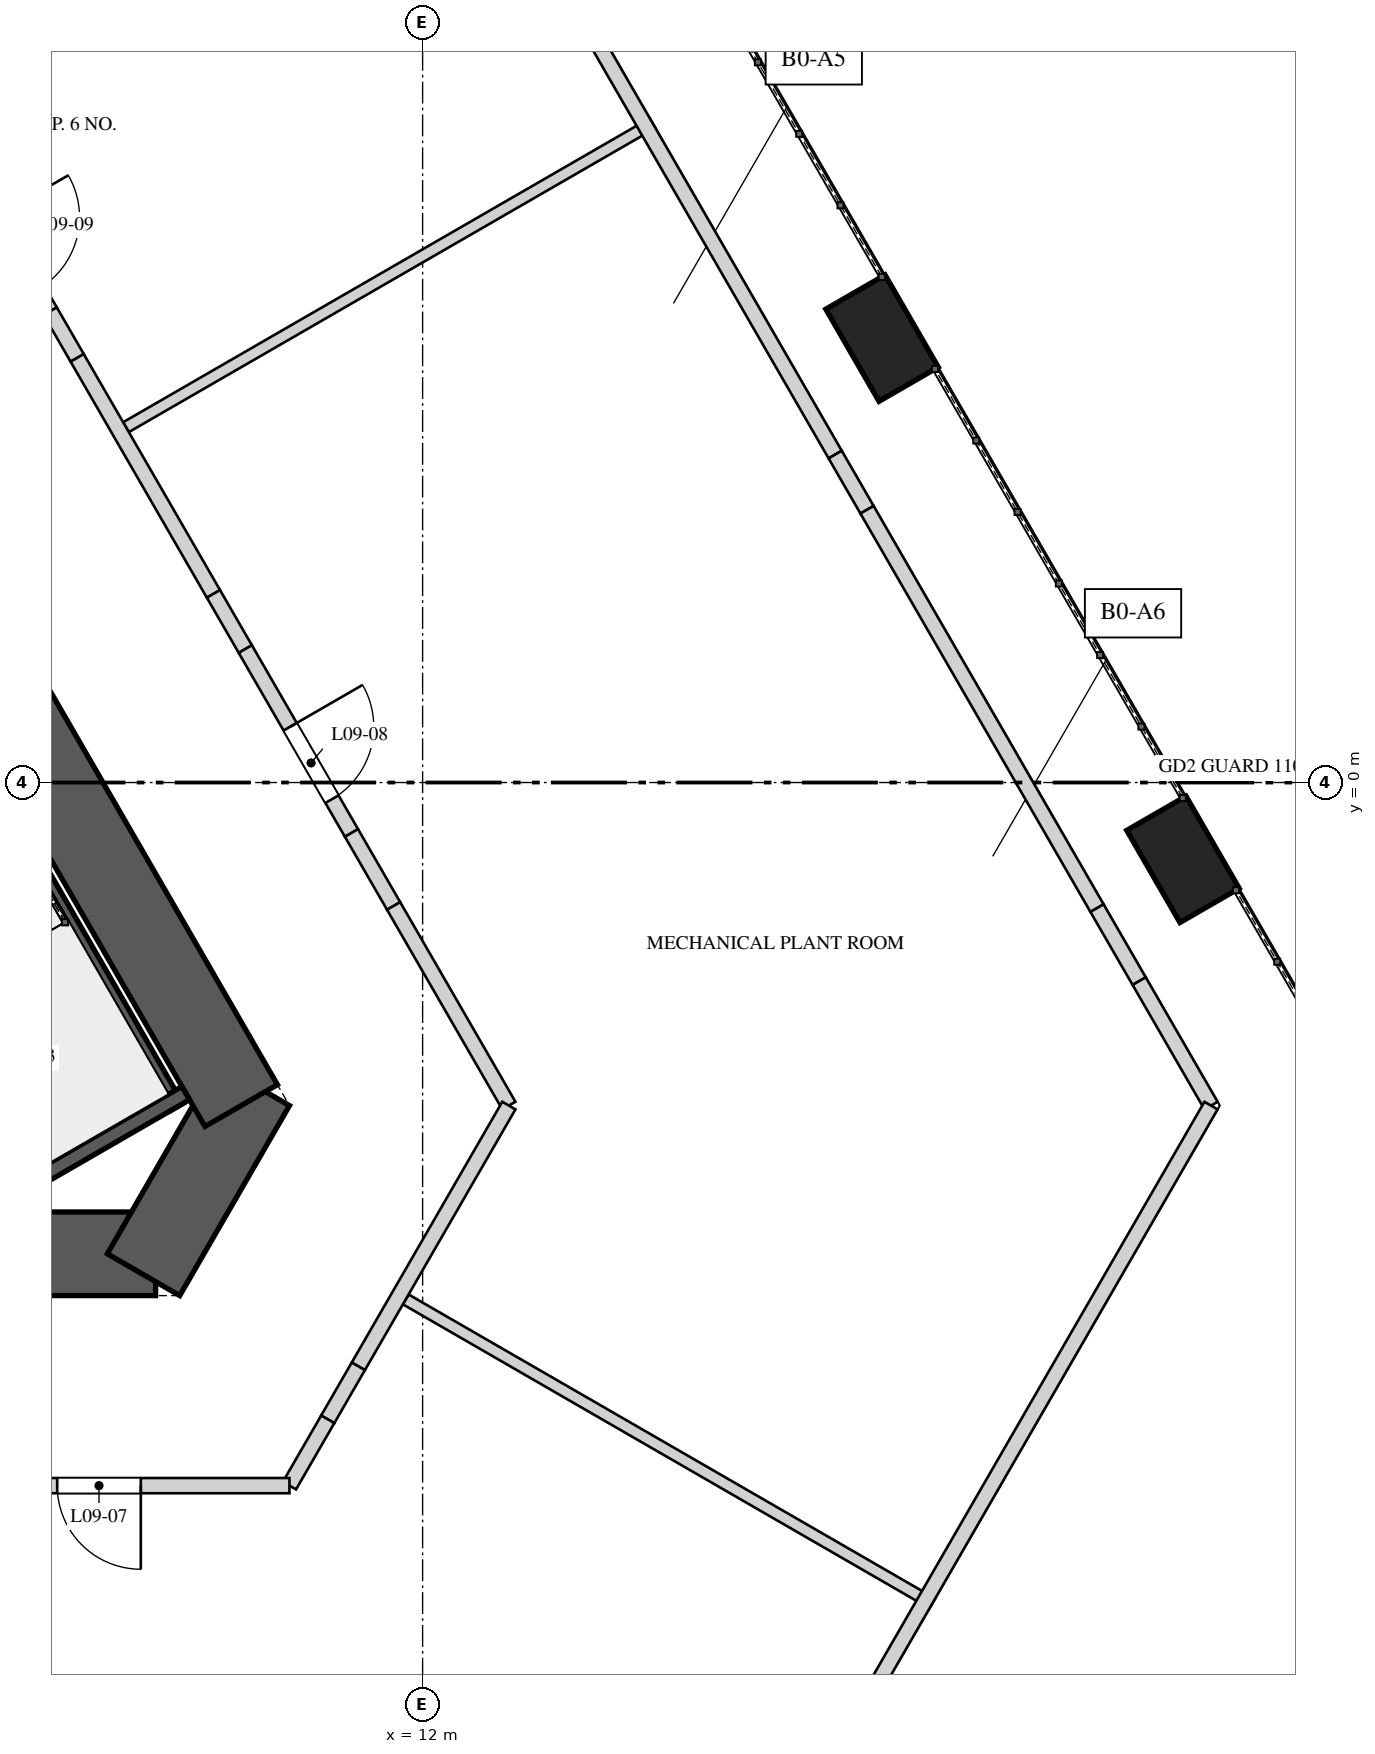
"""IFC4 building model, lengths in metres.
Left out: names, types, materials, properties, quantities, classifications, styles, units other than length and angle.
Written with IfcOpenShell. Run it as: python <this file> out.ifc"""

import sys

from ifc_helpers import new_model, si_unit, direction, frame, frame_2d, origin, origin_2d, place, context, subcontext, project, spatial, rectangle, extrude, element, fill, save


model = new_model("IFC4")
c1 = context("Model", 3, precision=1e-05, world=origin(), true_north=direction((0.0, 1.0)))
c2 = subcontext(c1, "Body", "Model", "MODEL_VIEW")
j1 = project(units=[si_unit("LENGTHUNIT", "METRE"), si_unit("PLANEANGLEUNIT", "RADIAN")], contexts=[c1])
p1 = place(None, origin())
s1 = spatial("IfcSite", under=j1, at=p1, CompositionType="ELEMENT")
p2 = place(p1, origin())
s2 = spatial("IfcBuilding", under=s1, at=p2, CompositionType="ELEMENT")
p3 = place(p2, frame((0.0, 0.0, 46.0)))
s3 = spatial("IfcBuildingStorey", under=s2, at=p3, CompositionType="ELEMENT", Elevation=46.0)
p4 = place(p3, frame((-8.487, -6.2, 0.0), z_axis=(0.0, 0.0, 1.0), x_axis=(1.0, 0.0, 0.0)))
e1 = element("IfcWall", 1, at=p4, inside=s3, PredefinedType="SHEAR", context=c2, shape_type="SweptSolid", body=[
    extrude(rectangle(XDim=16.974, YDim=1.1, at=frame_2d((8.487, 0.0))), origin(), (0.0, 0.0, 1.0), 5.2),
])
p5 = place(p4, frame((6.692, 0.0, 0.0)))
e2 = element("IfcOpeningElement", 2, at=p5, cuts=e1, PredefinedType="OPENING", context=c2, shape_type="SweptSolid", body=[
    extrude(rectangle(XDim=1.0, YDim=2.4, at=frame_2d((0.5, 1.2))), frame((0.0, 0.56, 0.0), z_axis=(0.0, -1.0, 0.0), x_axis=(1.0, 0.0, 0.0)), (0.0, 0.0, 1.0), 1.12),
])
p6 = place(p4, frame((14.397, 0.0, 0.0)))
e3 = element("IfcOpeningElement", 3, at=p6, cuts=e1, PredefinedType="OPENING", context=c2, shape_type="SweptSolid", body=[
    extrude(rectangle(XDim=0.8, YDim=2.1, at=frame_2d((0.4, 1.05))), frame((0.0, 0.56, 0.0), z_axis=(0.0, -1.0, 0.0), x_axis=(1.0, 0.0, 0.0)), (0.0, 0.0, 1.0), 1.12),
])
p7 = place(p3, frame((8.328, -6.475, 0.0), z_axis=(0.0, 0.0, 1.0), x_axis=(0.499995765644, 0.866027848477, 0.0)))
e4 = element("IfcWall", 4, at=p7, inside=s3, PredefinedType="SHEAR", context=c2, shape_type="SweptSolid", body=[
    extrude(rectangle(XDim=2.887, YDim=1.1, at=frame_2d((1.443, 0.0))), origin(), (0.0, 0.0, 1.0), 5.2),
])
p8 = place(p3, frame((9.613, -4.25, 0.0), z_axis=(0.0, 0.0, 1.0), x_axis=(-0.500001757713, 0.866024388966, 0.0)))
e5 = element("IfcWall", 5, at=p8, inside=s3, PredefinedType="SHEAR", context=c2, shape_type="SweptSolid", body=[
    extrude(rectangle(XDim=16.974, YDim=1.1, at=frame_2d((8.487, 0.0))), origin(), (0.0, 0.0, 1.0), 5.2),
])
p9 = place(p8, frame((6.762, 0.0, 0.0)))
e6 = element("IfcOpeningElement", 6, at=p9, cuts=e5, PredefinedType="OPENING", context=c2, shape_type="SweptSolid", body=[
    extrude(rectangle(XDim=1.0, YDim=2.4, at=frame_2d((0.5, 1.2))), frame((0.0, 0.56, 0.0), z_axis=(0.0, -1.0, 0.0), x_axis=(1.0, 0.0, 0.0)), (0.0, 0.0, 1.0), 1.12),
])
p10 = place(p8, frame((13.889, 0.0, 0.0)))
e7 = element("IfcOpeningElement", 7, at=p10, cuts=e5, PredefinedType="OPENING", context=c2, shape_type="SweptSolid", body=[
    extrude(rectangle(XDim=0.8, YDim=2.1, at=frame_2d((0.4, 1.05))), frame((0.0, 0.56, 0.0), z_axis=(0.0, -1.0, 0.0), x_axis=(1.0, 0.0, 0.0)), (0.0, 0.0, 1.0), 1.12),
])
for number, where, z_axis, x_axis in (
    (8, (22.003, -1.011, 0.0), (0.0, 0.0, 1.0), (-0.5, 0.866, 0.0)),
    (9, (18.044, 5.846, 0.0), (0.0, 0.0, 1.0), (-0.5, 0.866, 0.0)),
):
    element("IfcColumn", number, at=place(p3, frame(where, z_axis=z_axis, x_axis=x_axis)), inside=s3, PredefinedType="COLUMN", context=c2, shape_type="SweptSolid", body=[
        extrude(rectangle(XDim=1.4, YDim=0.9, at=origin_2d()), origin(), (0.0, 0.0, 1.0), 2.898),
    ])
p11 = place(p3, frame((8.76, -4.272, 0.0), z_axis=(0.0, 0.0, 1.0), x_axis=(-0.49998037582, 0.866036733513, 0.0)))
e10 = element("IfcWall", 10, at=p11, inside=s3, PredefinedType="SOLIDWALL", context=c2, shape_type="SweptSolid", body=[
    extrude(rectangle(XDim=6.2, YDim=0.2, at=frame_2d((3.1, 0.0))), origin(), (0.0, 0.0, 1.0), 4.85),
])
p12 = place(p3, frame((6.174, -5.65, 0.0), z_axis=(0.0, 0.0, 1.0), x_axis=(0.866054327916, 0.499949898588, 0.0)))
e11 = element("IfcWall", 11, at=p12, inside=s3, PredefinedType="SOLIDWALL", context=c2, shape_type="SweptSolid", body=[
    extrude(rectangle(XDim=3.128, YDim=0.2, at=frame_2d((1.564, 0.0))), origin(), (0.0, 0.0, 1.0), 4.85),
])
p13 = place(p3, frame((5.398, -9.35, 0.0), z_axis=(0.0, 0.0, 1.0), x_axis=(0.500007658653, -0.866020982014, 0.0)))
e12 = element("IfcWall", 12, at=p13, inside=s3, PredefinedType="PARTITIONING", context=c2, shape_type="SweptSolid", body=[
    extrude(rectangle(XDim=9.238, YDim=0.15, at=frame_2d((4.619, 0.0))), origin(), (0.0, 0.0, 1.0), 4.85),
])
p14 = place(p3, frame((8.097, 4.675, 0.0), z_axis=(0.0, 0.0, 1.0), x_axis=(0.866018381195, 0.500012163284, 0.0)))
e13 = element("IfcWall", 13, at=p14, inside=s3, PredefinedType="PARTITIONING", context=c2, shape_type="SweptSolid", body=[
    extrude(rectangle(XDim=8.0, YDim=0.15, at=frame_2d((4.0, 0.0))), origin(), (0.0, 0.0, 1.0), 4.85),
])
p15 = place(p3, frame((8.458, 14.65, 0.0), z_axis=(0.0, 0.0, 1.0), x_axis=(-0.500013695359, -0.866017496621, 0.0)))
e14 = element("IfcWall", 14, at=p15, inside=s3, PredefinedType="PARTITIONING", context=c2, shape_type="SweptSolid", body=[
    extrude(rectangle(XDim=6.119, YDim=0.15, at=frame_2d((3.06, 0.0))), origin(), (0.0, 0.0, 1.0), 4.85),
])
p16 = place(p3, frame((11.778, -6.8, 0.0), z_axis=(0.0, 0.0, 1.0), x_axis=(0.866026010844, -0.49999894854, 0.0)))
e15 = element("IfcWall", 15, at=p16, inside=s3, PredefinedType="PARTITIONING", context=c2, shape_type="SweptSolid", body=[
    extrude(rectangle(XDim=8.0, YDim=0.15, at=frame_2d((4.0, 0.0))), origin(), (0.0, 0.0, 1.0), 4.85),
])
p17 = place(p3, frame((4.973, 9.887, 0.0), z_axis=(0.0, 0.0, 1.0), x_axis=(0.500000470374, -0.866025132214, 0.0)))
e16 = element("IfcWall", 16, at=p17, inside=s3, PredefinedType="SOLIDWALL", context=c2, shape_type="SweptSolid", body=[
    extrude(rectangle(XDim=4.257, YDim=0.2, at=frame_2d((2.128, 0.0))), origin(), (0.0, 0.0, 1.0), 4.85),
])
p18 = place(p17, frame((2.827, 0.0, 0.0)))
e17 = element("IfcOpeningElement", 17, at=p18, cuts=e16, PredefinedType="OPENING", context=c2, shape_type="SweptSolid", body=[
    extrude(rectangle(XDim=1.1, YDim=2.2, at=frame_2d((0.55, 1.1))), frame((0.0, 0.11, 0.0), z_axis=(0.0, -1.0, 0.0), x_axis=(1.0, 0.0, 0.0)), (0.0, 0.0, 1.0), 0.22),
])
p19 = place(p3, frame((7.101, 6.201, 0.0), z_axis=(0.0, 0.0, 1.0), x_axis=(0.499881507708, -0.866093804534, 0.0)))
e18 = element("IfcWall", 18, at=p19, inside=s3, PredefinedType="SOLIDWALL", context=c2, shape_type="SweptSolid", body=[
    extrude(rectangle(XDim=0.709, YDim=0.2, at=frame_2d((0.354, 0.0))), origin(), (0.0, 0.0, 1.0), 4.15),
])
p20 = place(p3, frame((7.455, 5.587, 0.0), z_axis=(0.0, 0.0, 1.0), x_axis=(0.500013241293, -0.866017758786, 0.0)))
e19 = element("IfcWall", 19, at=p20, inside=s3, PredefinedType="SOLIDWALL", context=c2, shape_type="SweptSolid", body=[
    extrude(rectangle(XDim=3.585, YDim=0.2, at=frame_2d((1.793, 0.0))), origin(), (0.0, 0.0, 1.0), 4.85),
])
p21 = place(p3, frame((9.248, 2.482, 0.0), z_axis=(0.0, 0.0, 1.0), x_axis=(0.500117447933, -0.865957584569, 0.0)))
e20 = element("IfcWall", 20, at=p21, inside=s3, PredefinedType="SOLIDWALL", context=c2, shape_type="SweptSolid", body=[
    extrude(rectangle(XDim=0.838, YDim=0.2, at=frame_2d((0.419, 0.0))), origin(), (0.0, 0.0, 1.0), 3.95),
])
p22 = place(p3, frame((9.667, 1.756, 0.0), z_axis=(0.0, 0.0, 1.0), x_axis=(0.499964529649, -0.866045881633, 0.0)))
e21 = element("IfcWall", 21, at=p22, inside=s3, PredefinedType="SOLIDWALL", context=c2, shape_type="SweptSolid", body=[
    extrude(rectangle(XDim=2.794, YDim=0.2, at=frame_2d((1.397, 0.0))), origin(), (0.0, 0.0, 1.0), 4.85),
])
p23 = place(p22, frame((1.18, 0.0, 0.0)))
e22 = element("IfcOpeningElement", 22, at=p23, cuts=e21, PredefinedType="OPENING", context=c2, shape_type="SweptSolid", body=[
    extrude(rectangle(XDim=1.1, YDim=2.2, at=frame_2d((0.55, 1.1))), frame((0.0, 0.11, 0.0), z_axis=(0.0, -1.0, 0.0), x_axis=(1.0, 0.0, 0.0)), (0.0, 0.0, 1.0), 0.22),
])
p24 = place(p3, frame((11.064, -0.663, 0.0), z_axis=(0.0, 0.0, 1.0), x_axis=(0.499951133605, -0.866053614973, 0.0)))
e23 = element("IfcWall", 23, at=p24, inside=s3, PredefinedType="SOLIDWALL", context=c2, shape_type="SweptSolid", body=[
    extrude(rectangle(XDim=1.109, YDim=0.2, at=frame_2d((0.554, 0.0))), origin(), (0.0, 0.0, 1.0), 3.75),
])
p25 = place(p3, frame((11.618, -1.624, 0.0), z_axis=(0.0, 0.0, 1.0), x_axis=(0.500026757412, -0.866009954834, 0.0)))
e24 = element("IfcWall", 24, at=p25, inside=s3, PredefinedType="SOLIDWALL", context=c2, shape_type="SweptSolid", body=[
    extrude(rectangle(XDim=3.032, YDim=0.2, at=frame_2d((1.516, 0.0))), origin(), (0.0, 0.0, 1.0), 4.85),
])
p26 = place(p3, frame((13.135, -4.25, 0.0), z_axis=(0.0, 0.0, 1.0), x_axis=(-0.499983883921, -0.866034708207, 0.0)))
e25 = element("IfcWall", 25, at=p26, inside=s3, PredefinedType="SOLIDWALL", context=c2, shape_type="SweptSolid", body=[
    extrude(rectangle(XDim=3.961, YDim=0.2, at=frame_2d((1.98, 0.0))), origin(), (0.0, 0.0, 1.0), 4.85),
])
p27 = place(p3, frame((11.154, -7.68, 0.0), z_axis=(0.0, 0.0, 1.0), x_axis=(-0.500151261923, -0.865938055058, 0.0)))
e26 = element("IfcWall", 26, at=p27, inside=s3, PredefinedType="SOLIDWALL", context=c2, shape_type="SweptSolid", body=[
    extrude(rectangle(XDim=0.805, YDim=0.2, at=frame_2d((0.402, 0.0))), origin(), (0.0, 0.0, 1.0), 3.95),
])
p28 = place(p3, frame((10.752, -8.377, 0.0), z_axis=(0.0, 0.0, 1.0), x_axis=(-0.499918237861, -0.866072604031, 0.0)))
e27 = element("IfcWall", 27, at=p28, inside=s3, PredefinedType="SOLIDWALL", context=c2, shape_type="SweptSolid", body=[
    extrude(rectangle(XDim=1.008, YDim=0.2, at=frame_2d((0.504, 0.0))), origin(), (0.0, 0.0, 1.0), 4.85),
])
p29 = place(p3, frame((10.248, -9.25, 0.0), z_axis=(0.0, 0.0, 1.0), x_axis=(-1.0, 0.0, 0.0)))
e28 = element("IfcWall", 28, at=p29, inside=s3, PredefinedType="SOLIDWALL", context=c2, shape_type="SweptSolid", body=[
    extrude(rectangle(XDim=3.191, YDim=0.2, at=frame_2d((1.595, 0.0))), origin(), (0.0, 0.0, 1.0), 4.85),
])
p30 = place(p29, frame((1.956, 0.0, 0.0)))
e29 = element("IfcOpeningElement", 29, at=p30, cuts=e28, PredefinedType="OPENING", context=c2, shape_type="SweptSolid", body=[
    extrude(rectangle(XDim=1.1, YDim=2.2, at=frame_2d((0.55, 1.1))), frame((0.0, 0.11, 0.0), z_axis=(0.0, -1.0, 0.0), x_axis=(1.0, 0.0, 0.0)), (0.0, 0.0, 1.0), 0.22),
])
p31 = place(p3, frame((13.75, 10.684, 0.0), z_axis=(0.0, 0.0, 1.0), x_axis=(0.499983921128, -0.866034686726, 0.0)))
e30 = element("IfcWall", 30, at=p31, inside=s3, PredefinedType="SOLIDWALL", context=c2, shape_type="SweptSolid", body=[
    extrude(rectangle(XDim=7.355, YDim=0.2, at=frame_2d((3.678, 0.0))), origin(), (0.0, 0.0, 1.0), 4.85),
])
p32 = place(p3, frame((17.427, 4.314, 0.0), z_axis=(0.0, 0.0, 1.0), x_axis=(0.500117447933, -0.865957584569, 0.0)))
e31 = element("IfcWall", 31, at=p32, inside=s3, PredefinedType="SOLIDWALL", context=c2, shape_type="SweptSolid", body=[
    extrude(rectangle(XDim=0.838, YDim=0.2, at=frame_2d((0.419, 0.0))), origin(), (0.0, 0.0, 1.0), 3.95),
])
p33 = place(p3, frame((17.847, 3.589, 0.0), z_axis=(0.0, 0.0, 1.0), x_axis=(0.500000658726, -0.866025023469, 0.0)))
e32 = element("IfcWall", 32, at=p33, inside=s3, PredefinedType="SOLIDWALL", context=c2, shape_type="SweptSolid", body=[
    extrude(rectangle(XDim=6.052, YDim=0.2, at=frame_2d((3.026, 0.0))), origin(), (0.0, 0.0, 1.0), 4.85),
])
p34 = place(p3, frame((20.873, -1.652, 0.0), z_axis=(0.0, 0.0, 1.0), x_axis=(0.499951133605, -0.866053614973, 0.0)))
e33 = element("IfcWall", 33, at=p34, inside=s3, PredefinedType="SOLIDWALL", context=c2, shape_type="SweptSolid", body=[
    extrude(rectangle(XDim=1.109, YDim=0.2, at=frame_2d((0.554, 0.0))), origin(), (0.0, 0.0, 1.0), 3.75),
])
p35 = place(p3, frame((21.427, -2.613, 0.0), z_axis=(0.0, 0.0, 1.0), x_axis=(0.5000279999, -0.866009237431, 0.0)))
e34 = element("IfcWall", 34, at=p35, inside=s3, PredefinedType="SOLIDWALL", context=c2, shape_type="SweptSolid", body=[
    extrude(rectangle(XDim=1.891, YDim=0.2, at=frame_2d((0.945, 0.0))), origin(), (0.0, 0.0, 1.0), 4.85),
])
p36 = place(p3, frame((22.372, -4.25, 0.0), z_axis=(0.0, 0.0, 1.0), x_axis=(-0.50000482836, -0.866022616111, 0.0)))
e35 = element("IfcWall", 35, at=p36, inside=s3, PredefinedType="SOLIDWALL", context=c2, shape_type="SweptSolid", body=[
    extrude(rectangle(XDim=9.455, YDim=0.2, at=frame_2d((4.728, 0.0))), origin(), (0.0, 0.0, 1.0), 4.85),
])
p37 = place(p30, origin())
e36 = element("IfcDoor", 36, at=p37, inside=s3, OperationType="SINGLE_SWING_LEFT", PredefinedType="DOOR", context=c2, shape_type="SweptSolid", body=[
    extrude(rectangle(XDim=1.1, YDim=2.2, at=frame_2d((0.55, 1.1))), frame((0.0, 0.025, 0.0), z_axis=(0.0, -1.0, 0.0), x_axis=(1.0, 0.0, 0.0)), (0.0, 0.0, 1.0), 0.05),
])
fill(e29, e36)
p38 = place(p23, origin())
e37 = element("IfcDoor", 37, at=p38, inside=s3, OperationType="SINGLE_SWING_RIGHT", PredefinedType="DOOR", context=c2, shape_type="SweptSolid", body=[
    extrude(rectangle(XDim=1.1, YDim=2.2, at=frame_2d((0.55, 1.1))), frame((0.0, 0.025, 0.0), z_axis=(0.0, -1.0, 0.0), x_axis=(1.0, 0.0, 0.0)), (0.0, 0.0, 1.0), 0.05),
])
fill(e22, e37)
save(model, sys.argv[1])
